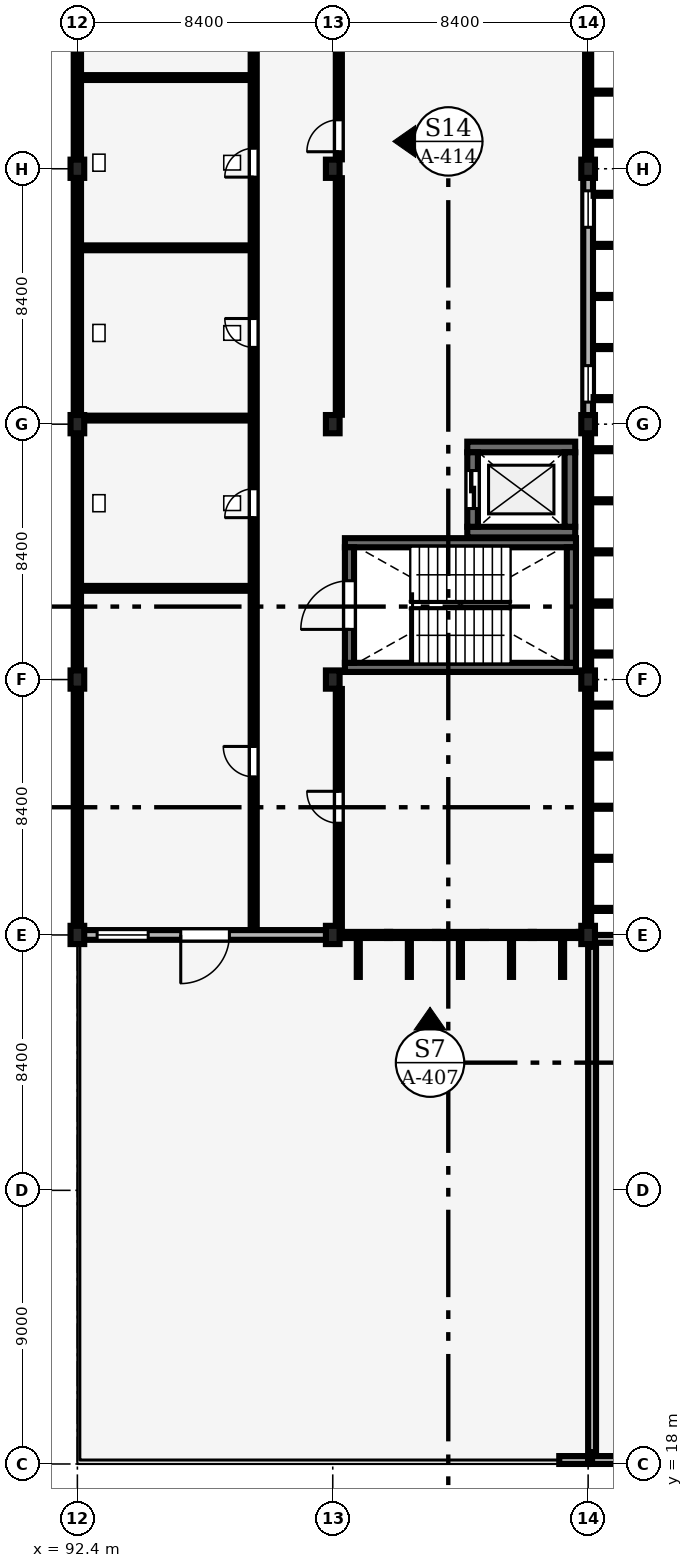
"""IFC4 building model, lengths in metres.
Left out: names, types, materials, properties, quantities, classifications, styles, units other than length and angle.
Written with IfcOpenShell. Run it as: python <this file> out.ifc"""

import sys

from ifc_helpers import new_model, si_unit, direction, frame, frame_2d, origin, origin_2d, place, context, subcontext, project, spatial, rectangle, extrude, element, fill, save


model = new_model("IFC4")
c1 = context("Model", 3, precision=1e-05, world=origin(), true_north=direction((0.0, 1.0)))
c2 = subcontext(c1, "Body", "Model", "MODEL_VIEW")
j1 = project(units=[si_unit("LENGTHUNIT", "METRE"), si_unit("PLANEANGLEUNIT", "RADIAN")], contexts=[c1])
p1 = place(None, origin())
s1 = spatial("IfcSite", under=j1, at=p1, CompositionType="ELEMENT")
p2 = place(p1, origin())
s2 = spatial("IfcBuilding", under=s1, at=p2, CompositionType="ELEMENT")
p3 = place(p2, frame((0.0, 0.0, 13.2)))
s3 = spatial("IfcBuildingStorey", under=s2, at=p3, CompositionType="ELEMENT", Elevation=13.2)
for number, where, z_axis, x_axis in (
    (1, (92.4, 35.4, 0.0), (0.0, 0.0, 1.0), (1.0, 0.0, 0.0)),
    (2, (92.4, 43.8, 0.0), (0.0, 0.0, 1.0), (1.0, 0.0, 0.0)),
    (3, (92.4, 52.2, 0.0), (0.0, 0.0, 1.0), (1.0, 0.0, 0.0)),
    (4, (92.4, 60.6, 0.0), (0.0, 0.0, 1.0), (1.0, 0.0, 0.0)),
    (5, (100.8, 35.4, 0.0), (0.0, 0.0, 1.0), (1.0, 0.0, 0.0)),
    (6, (100.8, 43.8, 0.0), (0.0, 0.0, 1.0), (1.0, 0.0, 0.0)),
    (7, (100.8, 52.2, 0.0), (0.0, 0.0, 1.0), (1.0, 0.0, 0.0)),
    (8, (100.8, 60.6, 0.0), (0.0, 0.0, 1.0), (1.0, 0.0, 0.0)),
    (9, (109.2, 35.4, 0.0), (0.0, 0.0, 1.0), (1.0, 0.0, 0.0)),
    (10, (109.2, 43.8, 0.0), (0.0, 0.0, 1.0), (1.0, 0.0, 0.0)),
    (11, (109.2, 52.2, 0.0), (0.0, 0.0, 1.0), (1.0, 0.0, 0.0)),
    (12, (109.2, 60.6, 0.0), (0.0, 0.0, 1.0), (1.0, 0.0, 0.0)),
):
    element("IfcColumn", number, at=place(p3, frame(where, z_axis=z_axis, x_axis=x_axis)), inside=s3, PredefinedType="COLUMN", context=c2, shape_type="SweptSolid", body=[
        extrude(rectangle(XDim=0.45, YDim=0.6, at=origin_2d()), origin(), (0.0, 0.0, 1.0), 4.2),
    ])
p4 = place(p3, frame((92.4, 35.675, 0.0), z_axis=(0.0, 0.0, 1.0), x_axis=(0.0, 1.0, 0.0)))
e13 = element("IfcWall", 13, at=p4, inside=s3, PredefinedType="SOLIDWALL", context=c2, shape_type="SweptSolid", body=[
    extrude(rectangle(XDim=7.85, YDim=0.24, at=frame_2d((3.925, 0.0))), origin(), (0.0, 0.0, 1.0), 1.15),
])
p5 = place(p3, frame((92.4, 44.075, 0.0), z_axis=(0.0, 0.0, 1.0), x_axis=(0.0, 1.0, 0.0)))
e14 = element("IfcWall", 14, at=p5, inside=s3, PredefinedType="SOLIDWALL", context=c2, shape_type="SweptSolid", body=[
    extrude(rectangle(XDim=7.85, YDim=0.24, at=frame_2d((3.925, 0.0))), origin(), (0.0, 0.0, 1.0), 1.15),
])
p6 = place(p3, frame((92.4, 52.475, 0.0), z_axis=(0.0, 0.0, 1.0), x_axis=(0.0, 1.0, 0.0)))
e15 = element("IfcWall", 15, at=p6, inside=s3, PredefinedType="SOLIDWALL", context=c2, shape_type="SweptSolid", body=[
    extrude(rectangle(XDim=7.85, YDim=0.24, at=frame_2d((3.925, 0.0))), origin(), (0.0, 0.0, 1.0), 1.15),
])
p7 = place(p3, frame((92.4, 60.875, 0.0), z_axis=(0.0, 0.0, 1.0), x_axis=(0.0, 1.0, 0.0)))
e16 = element("IfcWall", 16, at=p7, inside=s3, PredefinedType="SOLIDWALL", context=c2, shape_type="SweptSolid", body=[
    extrude(rectangle(XDim=7.85, YDim=0.24, at=frame_2d((3.925, 0.0))), origin(), (0.0, 0.0, 1.0), 1.15),
])
p8 = place(p3, frame((92.6, 35.4, 0.0), z_axis=(0.0, 0.0, 1.0), x_axis=(1.0, 0.0, 0.0)))
e17 = element("IfcWall", 17, at=p8, inside=s3, PredefinedType="SOLIDWALL", context=c2, shape_type="SweptSolid", body=[
    extrude(rectangle(XDim=8.0, YDim=0.32, at=frame_2d((4.0, 0.0))), origin(), (0.0, 0.0, 1.0), 3.43),
])
p9 = place(p8, frame((4.8, 0.0, 0.0), z_axis=(0.0, 0.0, 1.0), x_axis=(-1.0, 0.0, 0.0)))
e18 = element("IfcOpeningElement", 18, at=p9, cuts=e17, PredefinedType="OPENING", context=c2, shape_type="SweptSolid", body=[
    extrude(rectangle(XDim=1.6, YDim=2.3, at=frame_2d((0.8, 1.15))), frame((0.0, 0.17, 0.0), z_axis=(0.0, -1.0, 0.0), x_axis=(1.0, 0.0, 0.0)), (0.0, 0.0, 1.0), 0.34),
])
p10 = place(p8, frame((0.45, 0.0, 0.95)))
e19 = element("IfcOpeningElement", 19, at=p10, cuts=e17, PredefinedType="OPENING", context=c2, shape_type="SweptSolid", body=[
    extrude(rectangle(XDim=1.68, YDim=1.8, at=frame_2d((0.84, 0.9))), frame((0.0, 0.17, 0.0), z_axis=(0.0, -1.0, 0.0), x_axis=(1.0, 0.0, 0.0)), (0.0, 0.0, 1.0), 0.34),
])
p11 = place(p3, frame((109.2, 52.475, 0.0), z_axis=(0.0, 0.0, 1.0), x_axis=(0.0, 1.0, 0.0)))
e20 = element("IfcWall", 20, at=p11, inside=s3, PredefinedType="SOLIDWALL", context=c2, shape_type="SweptSolid", body=[
    extrude(rectangle(XDim=7.85, YDim=0.32, at=frame_2d((3.925, 0.0))), origin(), (0.0, 0.0, 1.0), 3.04),
])
p12 = place(p11, frame((0.45, 0.0, 0.85)))
e21 = element("IfcOpeningElement", 21, at=p12, cuts=e20, PredefinedType="OPENING", context=c2, shape_type="SweptSolid", body=[
    extrude(rectangle(XDim=1.2, YDim=1.8, at=frame_2d((0.6, 0.9))), frame((0.0, 0.17, 0.0), z_axis=(0.0, -1.0, 0.0), x_axis=(1.0, 0.0, 0.0)), (0.0, 0.0, 1.0), 0.34),
])
p13 = place(p11, frame((6.2, 0.0, 0.85)))
e22 = element("IfcOpeningElement", 22, at=p13, cuts=e20, PredefinedType="OPENING", context=c2, shape_type="SweptSolid", body=[
    extrude(rectangle(XDim=1.2, YDim=1.8, at=frame_2d((0.6, 0.9))), frame((0.0, 0.17, 0.0), z_axis=(0.0, -1.0, 0.0), x_axis=(1.0, 0.0, 0.0)), (0.0, 0.0, 1.0), 0.34),
])
for number, where, z_axis, x_axis in (
    (23, (109.33, 18.13, 0.0), (0.0, 0.0, 1.0), (1.0, 0.0, 0.0)),
    (24, (109.33, 35.27, 0.0), (0.0, 0.0, 1.0), (1.0, 0.0, 0.0)),
):
    element("IfcWall", number, at=place(p3, frame(where, z_axis=z_axis, x_axis=x_axis)), inside=s3, PredefinedType="PARAPET", context=c2, shape_type="SweptSolid", body=[
        extrude(rectangle(XDim=24.94, YDim=0.26, at=frame_2d((12.47, 0.0))), origin(), (0.0, 0.0, 1.0), 0.85),
    ])
p14 = place(p3, frame((109.33, 18.39, 0.0), z_axis=(0.0, 0.0, 1.0), x_axis=(0.0, 1.0, 0.0)))
e25 = element("IfcWall", 25, at=p14, inside=s3, PredefinedType="PARAPET", context=c2, shape_type="SweptSolid", body=[
    extrude(rectangle(XDim=16.62, YDim=0.26, at=frame_2d((8.31, 0.0))), origin(), (0.0, 0.0, 1.0), 0.85),
])
p15 = place(p3, frame((108.25, 18.13, 0.0), z_axis=(0.0, 0.0, 1.0), x_axis=(1.0, 0.0, 0.0)))
e26 = element("IfcWall", 26, at=p15, inside=s3, PredefinedType="PARAPET", context=c2, shape_type="SweptSolid", body=[
    extrude(rectangle(XDim=0.95, YDim=0.26, at=frame_2d((0.475, 0.0))), origin(), (0.0, 0.0, 1.0), 1.12),
])
for number, where, z_axis, x_axis in (
    (27, (101.2, 44.2, 0.0), (0.0, 0.0, 1.0), (1.0, 0.0, 0.0)),
    (28, (101.2, 48.3, 0.0), (0.0, 0.0, 1.0), (1.0, 0.0, 0.0)),
):
    element("IfcWall", number, at=place(p3, frame(where, z_axis=z_axis, x_axis=x_axis)), inside=s3, PredefinedType="SHEAR", context=c2, shape_type="SweptSolid", body=[
        extrude(rectangle(XDim=7.6, YDim=0.3, at=frame_2d((3.8, 0.0))), origin(), (0.0, 0.0, 1.0), 4.025),
    ])
p16 = place(p3, frame((101.35, 44.35, 0.0), z_axis=(0.0, 0.0, 1.0), x_axis=(0.0, 1.0, 0.0)))
e29 = element("IfcWall", 29, at=p16, inside=s3, PredefinedType="SHEAR", context=c2, shape_type="SweptSolid", body=[
    extrude(rectangle(XDim=3.8, YDim=0.3, at=frame_2d((1.9, 0.0))), origin(), (0.0, 0.0, 1.0), 4.025),
])
p17 = place(p16, frame((1.1, 0.0, 0.0)))
e30 = element("IfcOpeningElement", 30, at=p17, cuts=e29, PredefinedType="OPENING", context=c2, shape_type="SweptSolid", body=[
    extrude(rectangle(XDim=1.6, YDim=2.2, at=frame_2d((0.8, 1.1))), frame((0.0, 0.16, 0.0), z_axis=(0.0, -1.0, 0.0), x_axis=(1.0, 0.0, 0.0)), (0.0, 0.0, 1.0), 0.32),
])
p18 = place(p3, frame((108.65, 44.35, 0.0), z_axis=(0.0, 0.0, 1.0), x_axis=(0.0, 1.0, 0.0)))
e31 = element("IfcWall", 31, at=p18, inside=s3, PredefinedType="SHEAR", context=c2, shape_type="SweptSolid", body=[
    extrude(rectangle(XDim=3.8, YDim=0.3, at=frame_2d((1.9, 0.0))), origin(), (0.0, 0.0, 1.0), 4.025),
])
for number, where, z_axis, x_axis in (
    (32, (105.225, 48.65, 0.0), (0.0, 0.0, 1.0), (1.0, 0.0, 0.0)),
    (33, (105.225, 51.45, 0.0), (0.0, 0.0, 1.0), (1.0, 0.0, 0.0)),
):
    element("IfcWall", number, at=place(p3, frame(where, z_axis=z_axis, x_axis=x_axis)), inside=s3, PredefinedType="SHEAR", context=c2, shape_type="SweptSolid", body=[
        extrude(rectangle(XDim=3.55, YDim=0.35, at=frame_2d((1.775, 0.0))), origin(), (0.0, 0.0, 1.0), 3.92),
    ])
p19 = place(p3, frame((105.4, 48.825, 0.0), z_axis=(0.0, 0.0, 1.0), x_axis=(0.0, 1.0, 0.0)))
e34 = element("IfcWall", 34, at=p19, inside=s3, PredefinedType="SHEAR", context=c2, shape_type="SweptSolid", body=[
    extrude(rectangle(XDim=2.45, YDim=0.35, at=frame_2d((1.225, 0.0))), origin(), (0.0, 0.0, 1.0), 3.92),
])
p20 = place(p19, frame((0.6, 0.0, 0.0)))
e35 = element("IfcOpeningElement", 35, at=p20, cuts=e34, PredefinedType="OPENING", context=c2, shape_type="SweptSolid", body=[
    extrude(rectangle(XDim=1.25, YDim=2.25, at=frame_2d((0.625, 1.125))), frame((0.0, 0.185, 0.0), z_axis=(0.0, -1.0, 0.0), x_axis=(1.0, 0.0, 0.0)), (0.0, 0.0, 1.0), 0.37),
])
p21 = place(p3, frame((108.6, 48.825, 0.0), z_axis=(0.0, 0.0, 1.0), x_axis=(0.0, 1.0, 0.0)))
e36 = element("IfcWall", 36, at=p21, inside=s3, PredefinedType="SHEAR", context=c2, shape_type="SweptSolid", body=[
    extrude(rectangle(XDim=2.45, YDim=0.35, at=frame_2d((1.225, 0.0))), origin(), (0.0, 0.0, 1.0), 3.92),
])
p22 = place(p3, frame((92.525, 46.8, 0.0), z_axis=(0.0, 0.0, 1.0), x_axis=(1.0, 0.0, 0.0)))
e37 = element("IfcWall", 37, at=p22, inside=s3, PredefinedType="PARTITIONING", context=c2, shape_type="SweptSolid", body=[
    extrude(rectangle(XDim=5.57, YDim=0.16, at=frame_2d((2.785, 0.0))), origin(), (0.0, 0.0, 1.0), 3.46),
])
p23 = place(p3, frame((92.525, 52.4, 0.0), z_axis=(0.0, 0.0, 1.0), x_axis=(1.0, 0.0, 0.0)))
e38 = element("IfcWall", 38, at=p23, inside=s3, PredefinedType="PARTITIONING", context=c2, shape_type="SweptSolid", body=[
    extrude(rectangle(XDim=5.57, YDim=0.16, at=frame_2d((2.785, 0.0))), origin(), (0.0, 0.0, 1.0), 3.14),
])
for number, where, z_axis, x_axis in (
    (39, (92.525, 58.0, 0.0), (0.0, 0.0, 1.0), (1.0, 0.0, 0.0)),
    (40, (92.525, 63.6, 0.0), (0.0, 0.0, 1.0), (1.0, 0.0, 0.0)),
):
    element("IfcWall", number, at=place(p3, frame(where, z_axis=z_axis, x_axis=x_axis)), inside=s3, PredefinedType="PARTITIONING", context=c2, shape_type="SweptSolid", body=[
        extrude(rectangle(XDim=5.57, YDim=0.16, at=frame_2d((2.785, 0.0))), origin(), (0.0, 0.0, 1.0), 3.46),
    ])
p24 = place(p3, frame((98.2, 35.565, 0.0), z_axis=(0.0, 0.0, 1.0), x_axis=(0.0, 1.0, 0.0)))
e41 = element("IfcWall", 41, at=p24, inside=s3, PredefinedType="PARTITIONING", context=c2, shape_type="SweptSolid", body=[
    extrude(rectangle(XDim=50.225, YDim=0.2, at=frame_2d((25.113, 0.0))), origin(), (0.0, 0.0, 1.0), 3.9),
])
p25 = place(p24, frame((5.035, 0.0, 0.0)))
e42 = element("IfcOpeningElement", 42, at=p25, cuts=e41, PredefinedType="OPENING", context=c2, shape_type="SweptSolid", body=[
    extrude(rectangle(XDim=1.0, YDim=2.15, at=frame_2d((0.5, 1.075))), frame((0.0, 0.11, 0.0), z_axis=(0.0, -1.0, 0.0), x_axis=(1.0, 0.0, 0.0)), (0.0, 0.0, 1.0), 0.22),
])
p26 = place(p24, frame((13.56, 0.0, 0.0)))
e43 = element("IfcOpeningElement", 43, at=p26, cuts=e41, PredefinedType="OPENING", context=c2, shape_type="SweptSolid", body=[
    extrude(rectangle(XDim=0.95, YDim=2.2, at=frame_2d((0.475, 1.1))), frame((0.0, 0.11, 0.0), z_axis=(0.0, -1.0, 0.0), x_axis=(1.0, 0.0, 0.0)), (0.0, 0.0, 1.0), 0.22),
])
p27 = place(p24, frame((19.16, 0.0, 0.0)))
e44 = element("IfcOpeningElement", 44, at=p27, cuts=e41, PredefinedType="OPENING", context=c2, shape_type="SweptSolid", body=[
    extrude(rectangle(XDim=0.95, YDim=2.2, at=frame_2d((0.475, 1.1))), frame((0.0, 0.11, 0.0), z_axis=(0.0, -1.0, 0.0), x_axis=(1.0, 0.0, 0.0)), (0.0, 0.0, 1.0), 0.22),
])
p28 = place(p24, frame((24.76, 0.0, 0.0)))
e45 = element("IfcOpeningElement", 45, at=p28, cuts=e41, PredefinedType="OPENING", context=c2, shape_type="SweptSolid", body=[
    extrude(rectangle(XDim=0.95, YDim=2.1, at=frame_2d((0.475, 1.05))), frame((0.0, 0.11, 0.0), z_axis=(0.0, -1.0, 0.0), x_axis=(1.0, 0.0, 0.0)), (0.0, 0.0, 1.0), 0.22),
])
p29 = place(p24, frame((33.035, 0.0, 0.0)))
e46 = element("IfcOpeningElement", 46, at=p29, cuts=e41, PredefinedType="OPENING", context=c2, shape_type="SweptSolid", body=[
    extrude(rectangle(XDim=1.0, YDim=2.15, at=frame_2d((0.5, 1.075))), frame((0.0, 0.11, 0.0), z_axis=(0.0, -1.0, 0.0), x_axis=(1.0, 0.0, 0.0)), (0.0, 0.0, 1.0), 0.22),
])
p30 = place(p24, frame((44.135, 0.0, 0.0)))
e47 = element("IfcOpeningElement", 47, at=p30, cuts=e41, PredefinedType="OPENING", context=c2, shape_type="SweptSolid", body=[
    extrude(rectangle(XDim=1.0, YDim=2.15, at=frame_2d((0.5, 1.075))), frame((0.0, 0.11, 0.0), z_axis=(0.0, -1.0, 0.0), x_axis=(1.0, 0.0, 0.0)), (0.0, 0.0, 1.0), 0.22),
])
p31 = place(p3, frame((101.0, 35.565, 0.0), z_axis=(0.0, 0.0, 1.0), x_axis=(0.0, 1.0, 0.0)))
e48 = element("IfcWall", 48, at=p31, inside=s3, PredefinedType="PARTITIONING", context=c2, shape_type="SweptSolid", body=[
    extrude(rectangle(XDim=7.925, YDim=0.2, at=frame_2d((3.962, 0.0))), origin(), (0.0, 0.0, 1.0), 3.43),
])
p32 = place(p31, frame((3.51, 0.0, 0.0)))
e49 = element("IfcOpeningElement", 49, at=p32, cuts=e48, PredefinedType="OPENING", context=c2, shape_type="SweptSolid", body=[
    extrude(rectangle(XDim=1.05, YDim=2.2, at=frame_2d((0.525, 1.1))), frame((0.0, 0.11, 0.0), z_axis=(0.0, -1.0, 0.0), x_axis=(1.0, 0.0, 0.0)), (0.0, 0.0, 1.0), 0.22),
])
p33 = place(p3, frame((101.0, 52.51, 0.0), z_axis=(0.0, 0.0, 1.0), x_axis=(0.0, 1.0, 0.0)))
e50 = element("IfcWall", 50, at=p33, inside=s3, PredefinedType="PARTITIONING", context=c2, shape_type="SweptSolid", body=[
    extrude(rectangle(XDim=7.78, YDim=0.2, at=frame_2d((3.89, 0.0))), origin(), (0.0, 0.0, 1.0), 3.24),
])
p34 = place(p3, frame((101.0, 60.91, 0.0), z_axis=(0.0, 0.0, 1.0), x_axis=(0.0, 1.0, 0.0)))
e51 = element("IfcWall", 51, at=p34, inside=s3, PredefinedType="PARTITIONING", context=c2, shape_type="SweptSolid", body=[
    extrude(rectangle(XDim=7.78, YDim=0.2, at=frame_2d((3.89, 0.0))), origin(), (0.0, 0.0, 1.0), 3.29),
])
p35 = place(p34, frame((0.25, 0.0, 0.0)))
e52 = element("IfcOpeningElement", 52, at=p35, cuts=e51, PredefinedType="OPENING", context=c2, shape_type="SweptSolid", body=[
    extrude(rectangle(XDim=1.05, YDim=2.2, at=frame_2d((0.525, 1.1))), frame((0.0, 0.11, 0.0), z_axis=(0.0, -1.0, 0.0), x_axis=(1.0, 0.0, 0.0)), (0.0, 0.0, 1.0), 0.22),
])
p36 = place(p9, origin())
e53 = element("IfcDoor", 53, at=p36, inside=s3, OperationType="DOUBLE_DOOR_SINGLE_SWING", PredefinedType="DOOR", context=c2, shape_type="SweptSolid", body=[
    extrude(rectangle(XDim=1.6, YDim=2.3, at=frame_2d((0.8, 1.15))), frame((0.0, 0.025, 0.0), z_axis=(0.0, -1.0, 0.0), x_axis=(1.0, 0.0, 0.0)), (0.0, 0.0, 1.0), 0.05),
])
fill(e18, e53)
p37 = place(p10, origin())
e54 = element("IfcWindow", 54, at=p37, inside=s3, PartitioningType="SINGLE_PANEL", PredefinedType="WINDOW", context=c2, shape_type="SweptSolid", body=[
    extrude(rectangle(XDim=1.68, YDim=1.8, at=frame_2d((0.84, 0.9))), frame((0.0, 0.03, 0.0), z_axis=(0.0, -1.0, 0.0), x_axis=(1.0, 0.0, 0.0)), (0.0, 0.0, 1.0), 0.06),
])
fill(e19, e54)
p38 = place(p12, origin())
e55 = element("IfcWindow", 55, at=p38, inside=s3, PartitioningType="SINGLE_PANEL", PredefinedType="WINDOW", context=c2, shape_type="SweptSolid", body=[
    extrude(rectangle(XDim=1.2, YDim=1.8, at=frame_2d((0.6, 0.9))), frame((0.0, 0.03, 0.0), z_axis=(0.0, -1.0, 0.0), x_axis=(1.0, 0.0, 0.0)), (0.0, 0.0, 1.0), 0.06),
])
fill(e21, e55)
p39 = place(p13, origin())
e56 = element("IfcWindow", 56, at=p39, inside=s3, PartitioningType="SINGLE_PANEL", PredefinedType="WINDOW", context=c2, shape_type="SweptSolid", body=[
    extrude(rectangle(XDim=1.2, YDim=1.8, at=frame_2d((0.6, 0.9))), frame((0.0, 0.03, 0.0), z_axis=(0.0, -1.0, 0.0), x_axis=(1.0, 0.0, 0.0)), (0.0, 0.0, 1.0), 0.06),
])
fill(e22, e56)
p40 = place(p17, origin())
e57 = element("IfcDoor", 57, at=p40, inside=s3, OperationType="DOUBLE_DOOR_SINGLE_SWING", PredefinedType="DOOR", context=c2, shape_type="SweptSolid", body=[
    extrude(rectangle(XDim=1.6, YDim=2.2, at=frame_2d((0.8, 1.1))), frame((0.0, 0.025, 0.0), z_axis=(0.0, -1.0, 0.0), x_axis=(1.0, 0.0, 0.0)), (0.0, 0.0, 1.0), 0.05),
])
fill(e30, e57)
p41 = place(p20, origin())
e58 = element("IfcDoor", 58, at=p41, inside=s3, OperationType="DOUBLE_DOOR_SLIDING", PredefinedType="DOOR", context=c2, shape_type="SweptSolid", body=[
    extrude(rectangle(XDim=1.25, YDim=2.25, at=frame_2d((0.625, 1.125))), frame((0.0, 0.025, 0.0), z_axis=(0.0, -1.0, 0.0), x_axis=(1.0, 0.0, 0.0)), (0.0, 0.0, 1.0), 0.05),
])
fill(e35, e58)
p42 = place(p25, origin())
e59 = element("IfcDoor", 59, at=p42, inside=s3, OperationType="SINGLE_SWING_RIGHT", PredefinedType="DOOR", context=c2, shape_type="SweptSolid", body=[
    extrude(rectangle(XDim=1.0, YDim=2.15, at=frame_2d((0.5, 1.075))), frame((0.0, 0.025, 0.0), z_axis=(0.0, -1.0, 0.0), x_axis=(1.0, 0.0, 0.0)), (0.0, 0.0, 1.0), 0.05),
])
fill(e42, e59)
p43 = place(p26, origin())
e60 = element("IfcDoor", 60, at=p43, inside=s3, OperationType="SINGLE_SWING_LEFT", PredefinedType="DOOR", context=c2, shape_type="SweptSolid", body=[
    extrude(rectangle(XDim=0.95, YDim=2.2, at=frame_2d((0.475, 1.1))), frame((0.0, 0.025, 0.0), z_axis=(0.0, -1.0, 0.0), x_axis=(1.0, 0.0, 0.0)), (0.0, 0.0, 1.0), 0.05),
])
fill(e43, e60)
p44 = place(p27, origin())
e61 = element("IfcDoor", 61, at=p44, inside=s3, OperationType="SINGLE_SWING_RIGHT", PredefinedType="DOOR", context=c2, shape_type="SweptSolid", body=[
    extrude(rectangle(XDim=0.95, YDim=2.2, at=frame_2d((0.475, 1.1))), frame((0.0, 0.025, 0.0), z_axis=(0.0, -1.0, 0.0), x_axis=(1.0, 0.0, 0.0)), (0.0, 0.0, 1.0), 0.05),
])
fill(e44, e61)
p45 = place(p28, origin())
e62 = element("IfcDoor", 62, at=p45, inside=s3, OperationType="SINGLE_SWING_LEFT", PredefinedType="DOOR", context=c2, shape_type="SweptSolid", body=[
    extrude(rectangle(XDim=0.95, YDim=2.1, at=frame_2d((0.475, 1.05))), frame((0.0, 0.025, 0.0), z_axis=(0.0, -1.0, 0.0), x_axis=(1.0, 0.0, 0.0)), (0.0, 0.0, 1.0), 0.05),
])
fill(e45, e62)
p46 = place(p32, origin())
e63 = element("IfcDoor", 63, at=p46, inside=s3, OperationType="SINGLE_SWING_RIGHT", PredefinedType="DOOR", context=c2, shape_type="SweptSolid", body=[
    extrude(rectangle(XDim=1.05, YDim=2.2, at=frame_2d((0.525, 1.1))), frame((0.0, 0.025, 0.0), z_axis=(0.0, -1.0, 0.0), x_axis=(1.0, 0.0, 0.0)), (0.0, 0.0, 1.0), 0.05),
])
fill(e49, e63)
p47 = place(p35, origin())
e64 = element("IfcDoor", 64, at=p47, inside=s3, OperationType="SINGLE_SWING_LEFT", PredefinedType="DOOR", context=c2, shape_type="SweptSolid", body=[
    extrude(rectangle(XDim=1.05, YDim=2.2, at=frame_2d((0.525, 1.1))), frame((0.0, 0.025, 0.0), z_axis=(0.0, -1.0, 0.0), x_axis=(1.0, 0.0, 0.0)), (0.0, 0.0, 1.0), 0.05),
])
fill(e52, e64)
save(model, sys.argv[1])
